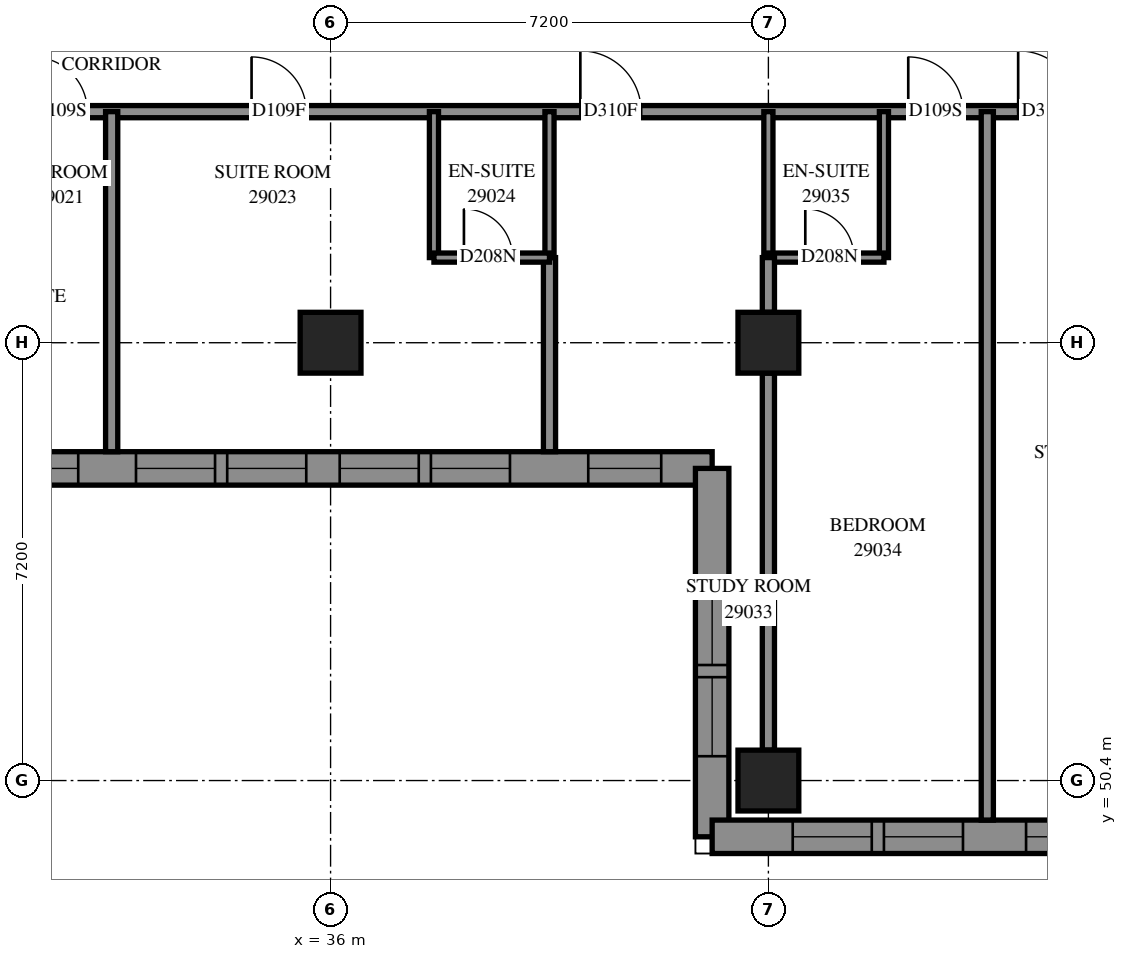
"""IFC4 building model, lengths in metres.
Left out: names, types, materials, properties, quantities, classifications, styles, units other than length and angle.
Written with IfcOpenShell. Run it as: python <this file> out.ifc"""

import sys

from ifc_helpers import new_model, si_unit, direction, frame, frame_2d, origin, origin_2d, place, context, subcontext, project, spatial, polyline, rectangle, outline, extrude, element, fill, save


model = new_model("IFC4")
c1 = context("Model", 3, precision=1e-05, world=origin(), true_north=direction((0.0, 1.0)))
c2 = subcontext(c1, "Body", "Model", "MODEL_VIEW")
j1 = project(units=[si_unit("LENGTHUNIT", "METRE"), si_unit("PLANEANGLEUNIT", "RADIAN")], contexts=[c1])
p1 = place(None, origin())
s1 = spatial("IfcSite", under=j1, at=p1, CompositionType="ELEMENT")
p2 = place(p1, origin())
s2 = spatial("IfcBuilding", under=s1, at=p2, CompositionType="ELEMENT")
p3 = place(p2, frame((0.0, 0.0, 108.4)))
s3 = spatial("IfcBuildingStorey", under=s2, at=p3, CompositionType="ELEMENT", Elevation=108.4)
for number, where, z_axis, x_axis in (
    (1, (36.0, 57.6, 0.0), (0.0, 0.0, 1.0), (1.0, 0.0, 0.0)),
    (2, (43.2, 50.4, 0.0), (0.0, 0.0, 1.0), (1.0, 0.0, 0.0)),
    (3, (43.2, 57.6, 0.0), (0.0, 0.0, 1.0), (1.0, 0.0, 0.0)),
):
    element("IfcColumn", number, at=place(p3, frame(where, z_axis=z_axis, x_axis=x_axis)), inside=s3, PredefinedType="COLUMN", context=c2, shape_type="SweptSolid", body=[
        extrude(rectangle(XDim=1.0, YDim=1.0, at=origin_2d()), origin(), (0.0, 0.0, 1.0), 3.1),
    ])
p4 = place(p3, frame((27.875, 55.533, 0.0), z_axis=(0.0, 0.0, 1.0), x_axis=(1.0, 0.0, 0.0)))
e4 = element("IfcWall", 4, at=p4, inside=s3, PredefinedType="SOLIDWALL", context=c2, shape_type="SweptSolid", body=[
    extrude(outline(polyline([(-0.275, -0.275), (14.125, -0.275), (14.675, 0.275), (0.275, 0.275), (-0.275, -0.275)])), origin(), (0.0, 0.0, 1.0), 3.1),
])
p5 = place(p4, frame((1.175, 0.0, 0.5)))
e5 = element("IfcOpeningElement", 5, at=p5, cuts=e4, PredefinedType="OPENING", context=c2, shape_type="SweptSolid", body=[
    extrude(rectangle(XDim=1.3, YDim=2.45, at=frame_2d((0.65, 1.225))), frame((0.0, 0.285, 0.0), z_axis=(0.0, -1.0, 0.0), x_axis=(1.0, 0.0, 0.0)), (0.0, 0.0, 1.0), 0.57),
])
p6 = place(p4, frame((2.675, 0.0, 0.5)))
e6 = element("IfcOpeningElement", 6, at=p6, cuts=e4, PredefinedType="OPENING", context=c2, shape_type="SweptSolid", body=[
    extrude(rectangle(XDim=1.3, YDim=2.45, at=frame_2d((0.65, 1.225))), frame((0.0, 0.285, 0.0), z_axis=(0.0, -1.0, 0.0), x_axis=(1.0, 0.0, 0.0)), (0.0, 0.0, 1.0), 0.57),
])
p7 = place(p4, frame((4.925, 0.0, 0.5)))
e7 = element("IfcOpeningElement", 7, at=p7, cuts=e4, PredefinedType="OPENING", context=c2, shape_type="SweptSolid", body=[
    extrude(rectangle(XDim=1.3, YDim=2.45, at=frame_2d((0.65, 1.225))), frame((0.0, 0.285, 0.0), z_axis=(0.0, -1.0, 0.0), x_axis=(1.0, 0.0, 0.0)), (0.0, 0.0, 1.0), 0.57),
])
p8 = place(p4, frame((6.425, 0.0, 0.5)))
e8 = element("IfcOpeningElement", 8, at=p8, cuts=e4, PredefinedType="OPENING", context=c2, shape_type="SweptSolid", body=[
    extrude(rectangle(XDim=1.3, YDim=2.45, at=frame_2d((0.65, 1.225))), frame((0.0, 0.285, 0.0), z_axis=(0.0, -1.0, 0.0), x_axis=(1.0, 0.0, 0.0)), (0.0, 0.0, 1.0), 0.57),
])
p9 = place(p4, frame((8.275, 0.0, 0.5)))
e9 = element("IfcOpeningElement", 9, at=p9, cuts=e4, PredefinedType="OPENING", context=c2, shape_type="SweptSolid", body=[
    extrude(rectangle(XDim=1.3, YDim=2.45, at=frame_2d((0.65, 1.225))), frame((0.0, 0.285, 0.0), z_axis=(0.0, -1.0, 0.0), x_axis=(1.0, 0.0, 0.0)), (0.0, 0.0, 1.0), 0.57),
])
p10 = place(p4, frame((9.775, 0.0, 0.5)))
e10 = element("IfcOpeningElement", 10, at=p10, cuts=e4, PredefinedType="OPENING", context=c2, shape_type="SweptSolid", body=[
    extrude(rectangle(XDim=1.3, YDim=2.45, at=frame_2d((0.65, 1.225))), frame((0.0, 0.285, 0.0), z_axis=(0.0, -1.0, 0.0), x_axis=(1.0, 0.0, 0.0)), (0.0, 0.0, 1.0), 0.57),
])
p11 = place(p4, frame((12.363, 0.0, 0.5)))
e11 = element("IfcOpeningElement", 11, at=p11, cuts=e4, PredefinedType="OPENING", context=c2, shape_type="SweptSolid", body=[
    extrude(rectangle(XDim=1.2, YDim=2.45, at=frame_2d((0.6, 1.225))), frame((0.0, 0.285, 0.0), z_axis=(0.0, -1.0, 0.0), x_axis=(1.0, 0.0, 0.0)), (0.0, 0.0, 1.0), 0.57),
])
p12 = place(p3, frame((42.275, 55.533, 0.0), z_axis=(0.0, 0.0, 1.0), x_axis=(0.0, -1.0, 0.0)))
e12 = element("IfcWall", 12, at=p12, inside=s3, PredefinedType="SOLIDWALL", context=c2, shape_type="SweptSolid", body=[
    extrude(outline(polyline([(0.275, -0.275), (6.333, -0.275), (5.783, 0.275), (-0.275, 0.275), (0.275, -0.275)])), origin(), (0.0, 0.0, 1.0), 3.1),
])
p13 = place(p12, frame((1.933, 0.0, 0.5)))
e13 = element("IfcOpeningElement", 13, at=p13, cuts=e12, PredefinedType="OPENING", context=c2, shape_type="SweptSolid", body=[
    extrude(rectangle(XDim=1.3, YDim=2.45, at=frame_2d((0.65, 1.225))), frame((0.0, 0.285, 0.0), z_axis=(0.0, -1.0, 0.0), x_axis=(1.0, 0.0, 0.0)), (0.0, 0.0, 1.0), 0.57),
])
p14 = place(p12, frame((3.433, 0.0, 0.5)))
e14 = element("IfcOpeningElement", 14, at=p14, cuts=e12, PredefinedType="OPENING", context=c2, shape_type="SweptSolid", body=[
    extrude(rectangle(XDim=1.3, YDim=2.45, at=frame_2d((0.65, 1.225))), frame((0.0, 0.285, 0.0), z_axis=(0.0, -1.0, 0.0), x_axis=(1.0, 0.0, 0.0)), (0.0, 0.0, 1.0), 0.57),
])
p15 = place(p3, frame((42.275, 49.475, 0.0), z_axis=(0.0, 0.0, 1.0), x_axis=(1.0, 0.0, 0.0)))
e15 = element("IfcWall", 15, at=p15, inside=s3, PredefinedType="SOLIDWALL", context=c2, shape_type="SweptSolid", body=[
    extrude(outline(polyline([(-0.275, -0.275), (6.925, -0.275), (7.475, 0.275), (0.275, 0.275), (-0.275, -0.275)])), origin(), (0.0, 0.0, 1.0), 3.1),
])
p16 = place(p15, frame((1.325, 0.0, 0.5)))
e16 = element("IfcOpeningElement", 16, at=p16, cuts=e15, PredefinedType="OPENING", context=c2, shape_type="SweptSolid", body=[
    extrude(rectangle(XDim=1.3, YDim=2.45, at=frame_2d((0.65, 1.225))), frame((0.0, 0.285, 0.0), z_axis=(0.0, -1.0, 0.0), x_axis=(1.0, 0.0, 0.0)), (0.0, 0.0, 1.0), 0.57),
])
p17 = place(p15, frame((2.825, 0.0, 0.5)))
e17 = element("IfcOpeningElement", 17, at=p17, cuts=e15, PredefinedType="OPENING", context=c2, shape_type="SweptSolid", body=[
    extrude(rectangle(XDim=1.3, YDim=2.45, at=frame_2d((0.65, 1.225))), frame((0.0, 0.285, 0.0), z_axis=(0.0, -1.0, 0.0), x_axis=(1.0, 0.0, 0.0)), (0.0, 0.0, 1.0), 0.57),
])
p18 = place(p15, frame((5.162, 0.0, 0.5)))
e18 = element("IfcOpeningElement", 18, at=p18, cuts=e15, PredefinedType="OPENING", context=c2, shape_type="SweptSolid", body=[
    extrude(rectangle(XDim=1.2, YDim=2.45, at=frame_2d((0.6, 1.225))), frame((0.0, 0.285, 0.0), z_axis=(0.0, -1.0, 0.0), x_axis=(1.0, 0.0, 0.0)), (0.0, 0.0, 1.0), 0.57),
])
p19 = place(p3, frame((28.8, 61.4, 0.0), z_axis=(0.0, 0.0, 1.0), x_axis=(1.0, 0.0, 0.0)))
e19 = element("IfcWall", 19, at=p19, inside=s3, PredefinedType="PARTITIONING", context=c2, shape_type="SweptSolid", body=[
    extrude(rectangle(XDim=24.2, YDim=0.2, at=frame_2d((12.1, 0.0))), origin(), (0.0, 0.0, 1.0), 3.1),
])
p20 = place(p19, frame((2.3, 0.0, 0.0)))
e20 = element("IfcOpeningElement", 20, at=p20, cuts=e19, PredefinedType="OPENING", context=c2, shape_type="SweptSolid", body=[
    extrude(rectangle(XDim=0.9, YDim=2.1, at=frame_2d((0.45, 1.05))), frame((0.0, 0.11, 0.0), z_axis=(0.0, -1.0, 0.0), x_axis=(1.0, 0.0, 0.0)), (0.0, 0.0, 1.0), 0.22),
])
p21 = place(p19, frame((5.901, 0.0, 0.0)))
e21 = element("IfcOpeningElement", 21, at=p21, cuts=e19, PredefinedType="OPENING", context=c2, shape_type="SweptSolid", body=[
    extrude(rectangle(XDim=0.9, YDim=2.1, at=frame_2d((0.45, 1.05))), frame((0.0, 0.11, 0.0), z_axis=(0.0, -1.0, 0.0), x_axis=(1.0, 0.0, 0.0)), (0.0, 0.0, 1.0), 0.22),
])
p22 = place(p19, frame((11.307, 0.0, 0.0)))
e22 = element("IfcOpeningElement", 22, at=p22, cuts=e19, PredefinedType="OPENING", context=c2, shape_type="SweptSolid", body=[
    extrude(rectangle(XDim=1.0, YDim=2.1, at=frame_2d((0.5, 1.05))), frame((0.0, 0.11, 0.0), z_axis=(0.0, -1.0, 0.0), x_axis=(1.0, 0.0, 0.0)), (0.0, 0.0, 1.0), 0.22),
])
p23 = place(p19, frame((16.7, 0.0, 0.0)))
e23 = element("IfcOpeningElement", 23, at=p23, cuts=e19, PredefinedType="OPENING", context=c2, shape_type="SweptSolid", body=[
    extrude(rectangle(XDim=0.9, YDim=2.1, at=frame_2d((0.45, 1.05))), frame((0.0, 0.11, 0.0), z_axis=(0.0, -1.0, 0.0), x_axis=(1.0, 0.0, 0.0)), (0.0, 0.0, 1.0), 0.22),
])
p24 = place(p19, frame((18.508, 0.0, 0.0)))
e24 = element("IfcOpeningElement", 24, at=p24, cuts=e19, PredefinedType="OPENING", context=c2, shape_type="SweptSolid", body=[
    extrude(rectangle(XDim=1.0, YDim=2.1, at=frame_2d((0.5, 1.05))), frame((0.0, 0.11, 0.0), z_axis=(0.0, -1.0, 0.0), x_axis=(1.0, 0.0, 0.0)), (0.0, 0.0, 1.0), 0.22),
])
p25 = place(p19, frame((23.074, 0.0, 0.0)))
e25 = element("IfcOpeningElement", 25, at=p25, cuts=e19, PredefinedType="OPENING", context=c2, shape_type="SweptSolid", body=[
    extrude(rectangle(XDim=1.0, YDim=2.1, at=frame_2d((0.5, 1.05))), frame((0.0, 0.11, 0.0), z_axis=(0.0, -1.0, 0.0), x_axis=(1.0, 0.0, 0.0)), (0.0, 0.0, 1.0), 0.22),
])
p26 = place(p3, frame((46.8, 49.75, 0.0), z_axis=(0.0, 0.0, 1.0), x_axis=(0.0, 1.0, 0.0)))
e26 = element("IfcWall", 26, at=p26, inside=s3, PredefinedType="PARTITIONING", context=c2, shape_type="SweptSolid", body=[
    extrude(rectangle(XDim=11.65, YDim=0.2, at=frame_2d((5.825, 0.0))), origin(), (0.0, 0.0, 1.0), 3.1),
])
p27 = place(p3, frame((43.2, 50.9, 0.0), z_axis=(0.0, 0.0, 1.0), x_axis=(0.0, 1.0, 0.0)))
e27 = element("IfcWall", 27, at=p27, inside=s3, PredefinedType="PARTITIONING", context=c2, shape_type="SweptSolid", body=[
    extrude(rectangle(XDim=6.2, YDim=0.2, at=frame_2d((3.1, 0.0))), origin(), (0.0, 0.0, 1.0), 2.6),
])
p28 = place(p3, frame((32.4, 55.808, 0.0), z_axis=(0.0, 0.0, 1.0), x_axis=(0.0, 1.0, 0.0)))
e28 = element("IfcWall", 28, at=p28, inside=s3, PredefinedType="PARTITIONING", context=c2, shape_type="SweptSolid", body=[
    extrude(rectangle(XDim=5.592, YDim=0.2, at=frame_2d((2.796, 0.0))), origin(), (0.0, 0.0, 1.0), 3.1),
])
p29 = place(p3, frame((39.6, 55.808, 0.0), z_axis=(0.0, 0.0, 1.0), x_axis=(0.0, 1.0, 0.0)))
e29 = element("IfcWall", 29, at=p29, inside=s3, PredefinedType="PARTITIONING", context=c2, shape_type="SweptSolid", body=[
    extrude(rectangle(XDim=3.192, YDim=0.2, at=frame_2d((1.596, 0.0))), origin(), (0.0, 0.0, 1.0), 3.1),
])
for number, where, z_axis, x_axis in (
    (30, (37.7, 59.0, 0.0), (0.0, 0.0, 1.0), (0.0, 1.0, 0.0)),
    (31, (39.6, 59.0, 0.0), (0.0, 0.0, 1.0), (0.0, 1.0, 0.0)),
    (32, (45.1, 59.0, 0.0), (0.0, 0.0, 1.0), (0.0, 1.0, 0.0)),
    (33, (43.2, 59.0, 0.0), (0.0, 0.0, 1.0), (0.0, 1.0, 0.0)),
):
    element("IfcWall", number, at=place(p3, frame(where, z_axis=z_axis, x_axis=x_axis)), inside=s3, PredefinedType="PARTITIONING", context=c2, shape_type="SweptSolid", body=[
        extrude(rectangle(XDim=2.4, YDim=0.15, at=frame_2d((1.2, 0.0))), origin(), (0.0, 0.0, 1.0), 3.1),
    ])
p30 = place(p3, frame((37.7, 59.0, 0.0), z_axis=(0.0, 0.0, 1.0), x_axis=(1.0, 0.0, 0.0)))
e34 = element("IfcWall", 34, at=p30, inside=s3, PredefinedType="PARTITIONING", context=c2, shape_type="SweptSolid", body=[
    extrude(rectangle(XDim=1.9, YDim=0.15, at=frame_2d((0.95, 0.0))), origin(), (0.0, 0.0, 1.0), 3.1),
])
p31 = place(p30, frame((0.493, 0.0, 0.0)))
e35 = element("IfcOpeningElement", 35, at=p31, cuts=e34, PredefinedType="OPENING", context=c2, shape_type="SweptSolid", body=[
    extrude(rectangle(XDim=0.8, YDim=2.1, at=frame_2d((0.4, 1.05))), frame((0.0, 0.085, 0.0), z_axis=(0.0, -1.0, 0.0), x_axis=(1.0, 0.0, 0.0)), (0.0, 0.0, 1.0), 0.17),
])
p32 = place(p3, frame((43.2, 59.0, 0.0), z_axis=(0.0, 0.0, 1.0), x_axis=(1.0, 0.0, 0.0)))
e36 = element("IfcWall", 36, at=p32, inside=s3, PredefinedType="PARTITIONING", context=c2, shape_type="SweptSolid", body=[
    extrude(rectangle(XDim=1.9, YDim=0.15, at=frame_2d((0.95, 0.0))), origin(), (0.0, 0.0, 1.0), 3.1),
])
p33 = place(p32, frame((0.607, 0.0, 0.0)))
e37 = element("IfcOpeningElement", 37, at=p33, cuts=e36, PredefinedType="OPENING", context=c2, shape_type="SweptSolid", body=[
    extrude(rectangle(XDim=0.8, YDim=2.1, at=frame_2d((0.4, 1.05))), frame((0.0, 0.085, 0.0), z_axis=(0.0, -1.0, 0.0), x_axis=(1.0, 0.0, 0.0)), (0.0, 0.0, 1.0), 0.17),
])
p34 = place(p3, frame((43.2, 58.1, 0.0), z_axis=(0.0, 0.0, 1.0), x_axis=(0.0, 1.0, 0.0)))
e38 = element("IfcWall", 38, at=p34, inside=s3, PredefinedType="PARTITIONING", context=c2, shape_type="SweptSolid", body=[
    extrude(rectangle(XDim=0.9, YDim=0.2, at=frame_2d((0.45, 0.0))), origin(), (0.0, 0.0, 1.0), 3.1),
])
p35 = place(p6, origin())
e39 = element("IfcWindow", 39, at=p35, inside=s3, PartitioningType="SINGLE_PANEL", PredefinedType="WINDOW", context=c2, shape_type="SweptSolid", body=[
    extrude(rectangle(XDim=1.3, YDim=2.45, at=frame_2d((0.65, 1.225))), frame((0.0, 0.155, 0.0), z_axis=(0.0, -1.0, 0.0), x_axis=(1.0, 0.0, 0.0)), (0.0, 0.0, 1.0), 0.06),
])
fill(e6, e39)
p36 = place(p7, origin())
e40 = element("IfcWindow", 40, at=p36, inside=s3, PartitioningType="SINGLE_PANEL", PredefinedType="WINDOW", context=c2, shape_type="SweptSolid", body=[
    extrude(rectangle(XDim=1.3, YDim=2.45, at=frame_2d((0.65, 1.225))), frame((0.0, 0.155, 0.0), z_axis=(0.0, -1.0, 0.0), x_axis=(1.0, 0.0, 0.0)), (0.0, 0.0, 1.0), 0.06),
])
fill(e7, e40)
p37 = place(p8, origin())
e41 = element("IfcWindow", 41, at=p37, inside=s3, PartitioningType="SINGLE_PANEL", PredefinedType="WINDOW", context=c2, shape_type="SweptSolid", body=[
    extrude(rectangle(XDim=1.3, YDim=2.45, at=frame_2d((0.65, 1.225))), frame((0.0, 0.155, 0.0), z_axis=(0.0, -1.0, 0.0), x_axis=(1.0, 0.0, 0.0)), (0.0, 0.0, 1.0), 0.06),
])
fill(e8, e41)
p38 = place(p9, origin())
e42 = element("IfcWindow", 42, at=p38, inside=s3, PartitioningType="SINGLE_PANEL", PredefinedType="WINDOW", context=c2, shape_type="SweptSolid", body=[
    extrude(rectangle(XDim=1.3, YDim=2.45, at=frame_2d((0.65, 1.225))), frame((0.0, 0.155, 0.0), z_axis=(0.0, -1.0, 0.0), x_axis=(1.0, 0.0, 0.0)), (0.0, 0.0, 1.0), 0.06),
])
fill(e9, e42)
p39 = place(p10, origin())
e43 = element("IfcWindow", 43, at=p39, inside=s3, PartitioningType="SINGLE_PANEL", PredefinedType="WINDOW", context=c2, shape_type="SweptSolid", body=[
    extrude(rectangle(XDim=1.3, YDim=2.45, at=frame_2d((0.65, 1.225))), frame((0.0, 0.155, 0.0), z_axis=(0.0, -1.0, 0.0), x_axis=(1.0, 0.0, 0.0)), (0.0, 0.0, 1.0), 0.06),
])
fill(e10, e43)
p40 = place(p11, origin())
e44 = element("IfcWindow", 44, at=p40, inside=s3, PartitioningType="SINGLE_PANEL", PredefinedType="WINDOW", context=c2, shape_type="SweptSolid", body=[
    extrude(rectangle(XDim=1.2, YDim=2.45, at=frame_2d((0.6, 1.225))), frame((0.0, 0.155, 0.0), z_axis=(0.0, -1.0, 0.0), x_axis=(1.0, 0.0, 0.0)), (0.0, 0.0, 1.0), 0.06),
])
fill(e11, e44)
p41 = place(p13, origin())
e45 = element("IfcWindow", 45, at=p41, inside=s3, PartitioningType="SINGLE_PANEL", PredefinedType="WINDOW", context=c2, shape_type="SweptSolid", body=[
    extrude(rectangle(XDim=1.3, YDim=2.45, at=frame_2d((0.65, 1.225))), frame((0.0, 0.155, 0.0), z_axis=(0.0, -1.0, 0.0), x_axis=(1.0, 0.0, 0.0)), (0.0, 0.0, 1.0), 0.06),
])
fill(e13, e45)
p42 = place(p14, origin())
e46 = element("IfcWindow", 46, at=p42, inside=s3, PartitioningType="SINGLE_PANEL", PredefinedType="WINDOW", context=c2, shape_type="SweptSolid", body=[
    extrude(rectangle(XDim=1.3, YDim=2.45, at=frame_2d((0.65, 1.225))), frame((0.0, 0.155, 0.0), z_axis=(0.0, -1.0, 0.0), x_axis=(1.0, 0.0, 0.0)), (0.0, 0.0, 1.0), 0.06),
])
fill(e14, e46)
p43 = place(p16, origin())
e47 = element("IfcWindow", 47, at=p43, inside=s3, PartitioningType="SINGLE_PANEL", PredefinedType="WINDOW", context=c2, shape_type="SweptSolid", body=[
    extrude(rectangle(XDim=1.3, YDim=2.45, at=frame_2d((0.65, 1.225))), frame((0.0, 0.155, 0.0), z_axis=(0.0, -1.0, 0.0), x_axis=(1.0, 0.0, 0.0)), (0.0, 0.0, 1.0), 0.06),
])
fill(e16, e47)
p44 = place(p17, origin())
e48 = element("IfcWindow", 48, at=p44, inside=s3, PartitioningType="SINGLE_PANEL", PredefinedType="WINDOW", context=c2, shape_type="SweptSolid", body=[
    extrude(rectangle(XDim=1.3, YDim=2.45, at=frame_2d((0.65, 1.225))), frame((0.0, 0.155, 0.0), z_axis=(0.0, -1.0, 0.0), x_axis=(1.0, 0.0, 0.0)), (0.0, 0.0, 1.0), 0.06),
])
fill(e17, e48)
p45 = place(p18, origin())
e49 = element("IfcWindow", 49, at=p45, inside=s3, PartitioningType="SINGLE_PANEL", PredefinedType="WINDOW", context=c2, shape_type="SweptSolid", body=[
    extrude(rectangle(XDim=1.2, YDim=2.45, at=frame_2d((0.6, 1.225))), frame((0.0, 0.155, 0.0), z_axis=(0.0, -1.0, 0.0), x_axis=(1.0, 0.0, 0.0)), (0.0, 0.0, 1.0), 0.06),
])
fill(e18, e49)
p46 = place(p20, origin())
e50 = element("IfcDoor", 50, at=p46, inside=s3, OperationType="SINGLE_SWING_LEFT", PredefinedType="DOOR", context=c2, shape_type="SweptSolid", body=[
    extrude(rectangle(XDim=0.9, YDim=2.1, at=frame_2d((0.45, 1.05))), frame((0.0, 0.025, 0.0), z_axis=(0.0, -1.0, 0.0), x_axis=(1.0, 0.0, 0.0)), (0.0, 0.0, 1.0), 0.05),
])
fill(e20, e50)
p47 = place(p21, origin())
e51 = element("IfcDoor", 51, at=p47, inside=s3, OperationType="SINGLE_SWING_RIGHT", PredefinedType="DOOR", context=c2, shape_type="SweptSolid", body=[
    extrude(rectangle(XDim=0.9, YDim=2.1, at=frame_2d((0.45, 1.05))), frame((0.0, 0.025, 0.0), z_axis=(0.0, -1.0, 0.0), x_axis=(1.0, 0.0, 0.0)), (0.0, 0.0, 1.0), 0.05),
])
fill(e21, e51)
p48 = place(p31, origin())
e52 = element("IfcDoor", 52, at=p48, inside=s3, OperationType="SINGLE_SWING_RIGHT", PredefinedType="DOOR", context=c2, shape_type="SweptSolid", body=[
    extrude(rectangle(XDim=0.8, YDim=2.1, at=frame_2d((0.4, 1.05))), frame((0.0, 0.025, 0.0), z_axis=(0.0, -1.0, 0.0), x_axis=(1.0, 0.0, 0.0)), (0.0, 0.0, 1.0), 0.05),
])
fill(e35, e52)
p49 = place(p22, origin())
e53 = element("IfcDoor", 53, at=p49, inside=s3, OperationType="SINGLE_SWING_RIGHT", PredefinedType="DOOR", context=c2, shape_type="SweptSolid", body=[
    extrude(rectangle(XDim=1.0, YDim=2.1, at=frame_2d((0.5, 1.05))), frame((0.0, 0.025, 0.0), z_axis=(0.0, -1.0, 0.0), x_axis=(1.0, 0.0, 0.0)), (0.0, 0.0, 1.0), 0.05),
])
fill(e22, e53)
p50 = place(p23, origin())
e54 = element("IfcDoor", 54, at=p50, inside=s3, OperationType="SINGLE_SWING_LEFT", PredefinedType="DOOR", context=c2, shape_type="SweptSolid", body=[
    extrude(rectangle(XDim=0.9, YDim=2.1, at=frame_2d((0.45, 1.05))), frame((0.0, 0.025, 0.0), z_axis=(0.0, -1.0, 0.0), x_axis=(1.0, 0.0, 0.0)), (0.0, 0.0, 1.0), 0.05),
])
fill(e23, e54)
p51 = place(p33, origin())
e55 = element("IfcDoor", 55, at=p51, inside=s3, OperationType="SINGLE_SWING_RIGHT", PredefinedType="DOOR", context=c2, shape_type="SweptSolid", body=[
    extrude(rectangle(XDim=0.8, YDim=2.1, at=frame_2d((0.4, 1.05))), frame((0.0, 0.025, 0.0), z_axis=(0.0, -1.0, 0.0), x_axis=(1.0, 0.0, 0.0)), (0.0, 0.0, 1.0), 0.05),
])
fill(e37, e55)
p52 = place(p24, origin())
e56 = element("IfcDoor", 56, at=p52, inside=s3, OperationType="SINGLE_SWING_RIGHT", PredefinedType="DOOR", context=c2, shape_type="SweptSolid", body=[
    extrude(rectangle(XDim=1.0, YDim=2.1, at=frame_2d((0.5, 1.05))), frame((0.0, 0.025, 0.0), z_axis=(0.0, -1.0, 0.0), x_axis=(1.0, 0.0, 0.0)), (0.0, 0.0, 1.0), 0.05),
])
fill(e24, e56)
save(model, sys.argv[1])
